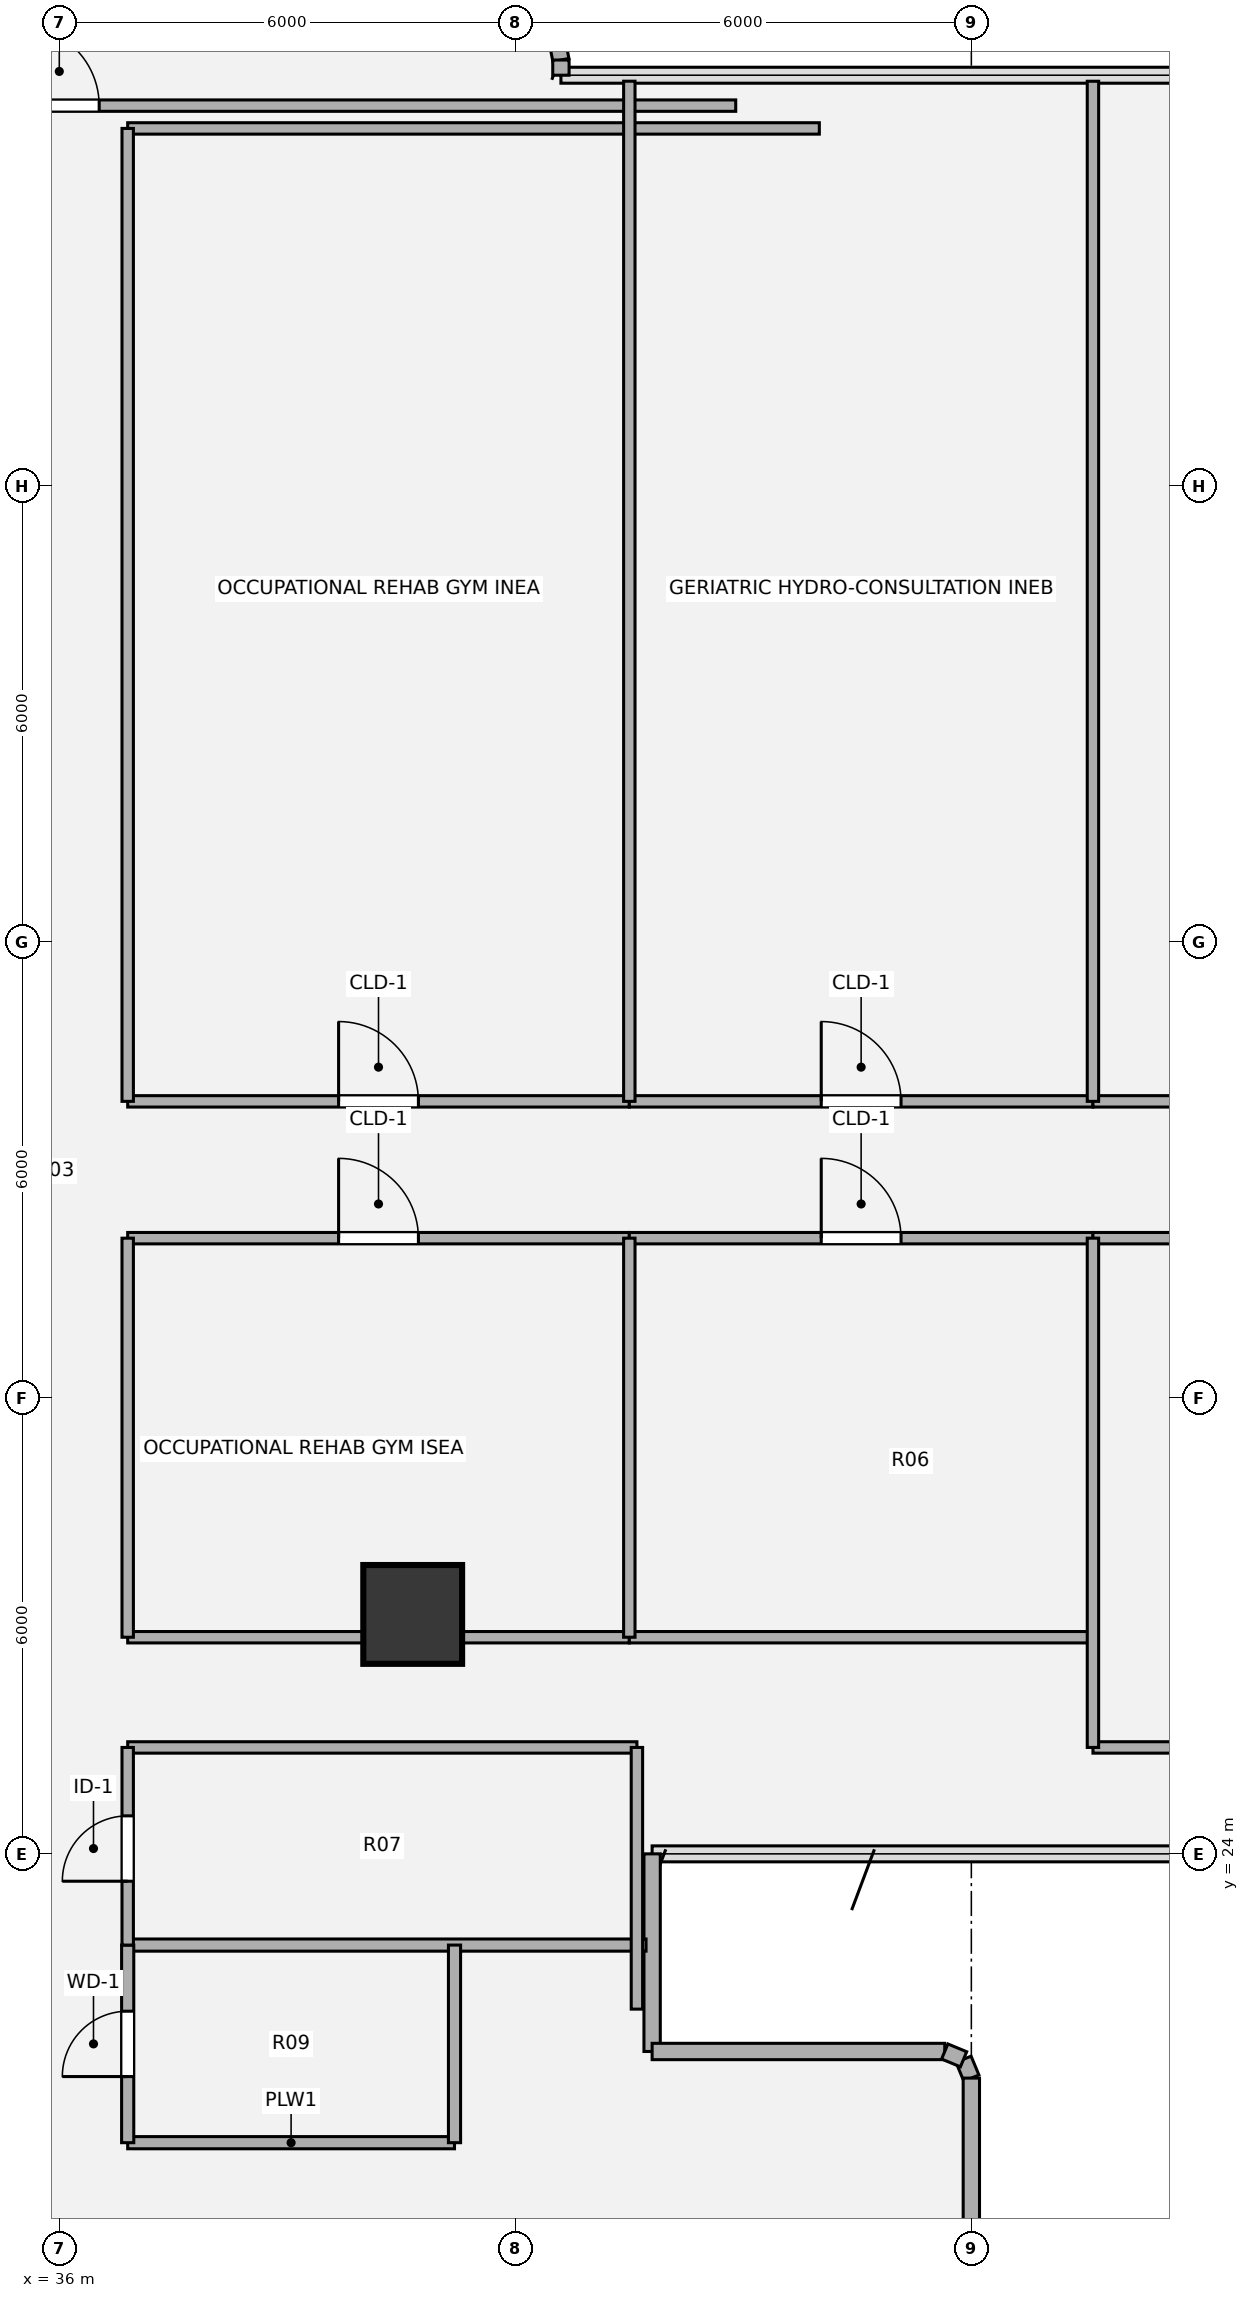
"""IFC4 building model, lengths in metres.
Left out: names, types, materials, properties, quantities, classifications, styles, units other than length and angle.
Written with IfcOpenShell. Run it as: python <this file> out.ifc"""

import sys

from ifc_helpers import new_model, si_unit, direction, frame, frame_2d, origin, origin_2d, place, context, subcontext, project, spatial, rectangle, hollow_circle, extrude, source, transform, mapped, element, fill, save


model = new_model("IFC4")
c1 = context("Model", 3, precision=1e-05, world=origin(), true_north=direction((0.0, 1.0)))
c2 = subcontext(c1, "Body", "Model", "MODEL_VIEW")
j1 = project(units=[si_unit("LENGTHUNIT", "METRE"), si_unit("PLANEANGLEUNIT", "RADIAN")], contexts=[c1])
p1 = place(None, origin())
s1 = spatial("IfcSite", under=j1, at=p1, CompositionType="ELEMENT")
p2 = place(p1, origin())
s2 = spatial("IfcBuilding", under=s1, at=p2, CompositionType="ELEMENT")
p3 = place(p2, frame((0.0, 0.0, 108.72)))
s3 = spatial("IfcBuildingStorey", under=s2, at=p3, CompositionType="ELEMENT", Elevation=108.72)
m1 = source(origin(), c2, "Body", "SweptSolid", [
    extrude(hollow_circle(Radius=0.65, WallThickness=0.045, at=origin_2d()), origin(), (0.0, 0.0, 1.0), 3.78),
])
p4 = place(p3, frame((40.65, 27.15, 0.0), z_axis=(0.0, 0.0, 1.0), x_axis=(1.0, 0.0, 0.0)))
e1 = element("IfcColumn", 1, at=p4, inside=s3, PredefinedType="COLUMN", context=c2, shape_type="MappedRepresentation", body=[
    mapped(m1, transform((0.0, 0.0, 0.0), x_axis=(1.0, 0.0, 0.0), y_axis=(0.0, 1.0, 0.0), z_axis=(0.0, 0.0, 1.0), scale=1.0)),
])
p5 = place(p3, frame((47.897, 21.298, 0.0), z_axis=(0.0, 0.0, 1.0), x_axis=(0.382673670509, -0.923883575944, 0.0)))
e2 = element("IfcWall", 2, at=p5, inside=s3, PredefinedType="SOLIDWALL", context=c2, shape_type="SweptSolid", body=[
    extrude(rectangle(XDim=0.268, YDim=0.215, at=frame_2d((0.134, 0.0))), origin(), (0.0, 0.0, 1.0), 3.53),
])
p6 = place(p3, frame((48.0, 21.05, 0.0), z_axis=(0.0, 0.0, 1.0), x_axis=(0.0, -1.0, 0.0)))
e3 = element("IfcWall", 3, at=p6, inside=s3, PredefinedType="SOLIDWALL", context=c2, shape_type="SweptSolid", body=[
    extrude(rectangle(XDim=2.62, YDim=0.215, at=frame_2d((1.31, 0.0))), origin(), (0.0, 0.0, 1.0), 3.53),
])
p7 = place(p3, frame((42.387, 48.671, 0.0), z_axis=(0.0, 0.0, 1.0), x_axis=(0.195127417394, -0.980777900945, 0.0)))
e4 = element("IfcWall", 4, at=p7, inside=s3, PredefinedType="SOLIDWALL", context=c2, shape_type="SweptSolid", body=[
    extrude(rectangle(XDim=1.092, YDim=0.215, at=frame_2d((0.546, 0.0))), origin(), (0.0, 0.0, 1.0), 3.53),
])
p8 = place(p3, frame((42.6, 47.6, 0.0), z_axis=(0.0, 0.0, 1.0), x_axis=(0.0, -1.0, 0.0)))
e5 = element("IfcWall", 5, at=p8, inside=s3, PredefinedType="SOLIDWALL", context=c2, shape_type="SweptSolid", body=[
    extrude(rectangle(XDim=0.2, YDim=0.215, at=frame_2d((0.1, 0.0))), origin(), (0.0, 0.0, 1.0), 3.53),
])
p9 = place(p3, frame((43.8, 24.0, 0.0), z_axis=(0.0, 0.0, 1.0), x_axis=(0.0, -1.0, 0.0)))
e6 = element("IfcWall", 6, at=p9, inside=s3, PredefinedType="SOLIDWALL", context=c2, shape_type="SweptSolid", body=[
    extrude(rectangle(XDim=2.6, YDim=0.215, at=frame_2d((1.3, 0.0))), origin(), (0.0, 0.0, 1.0), 3.53),
])
p10 = place(p3, frame((43.8, 21.4, 0.0), z_axis=(0.0, 0.0, 1.0), x_axis=(1.0, 0.0, 0.0)))
e7 = element("IfcWall", 7, at=p10, inside=s3, PredefinedType="SOLIDWALL", context=c2, shape_type="SweptSolid", body=[
    extrude(rectangle(XDim=3.85, YDim=0.215, at=frame_2d((1.925, 0.0))), origin(), (0.0, 0.0, 1.0), 3.53),
])
p11 = place(p3, frame((47.65, 21.4, 0.0), z_axis=(0.0, 0.0, 1.0), x_axis=(0.924205486139, -0.381895560841, 0.0)))
e8 = element("IfcWall", 8, at=p11, inside=s3, PredefinedType="SOLIDWALL", context=c2, shape_type="SweptSolid", body=[
    extrude(rectangle(XDim=0.268, YDim=0.215, at=frame_2d((0.134, 0.0))), origin(), (0.0, 0.0, 1.0), 3.53),
])
p12 = place(p3, frame((36.9, 20.2, 0.0), z_axis=(0.0, 0.0, 1.0), x_axis=(1.0, 0.0, 0.0)))
e9 = element("IfcWall", 9, at=p12, inside=s3, PredefinedType="PLUMBINGWALL", context=c2, shape_type="SweptSolid", body=[
    extrude(rectangle(XDim=4.3, YDim=0.16, at=frame_2d((2.15, 0.0))), origin(), (0.0, 0.0, 1.0), 3.5),
])
p13 = place(p3, frame((36.9, 22.8, 0.0), z_axis=(0.0, 0.0, 1.0), x_axis=(1.0, 0.0, 0.0)))
e10 = element("IfcWall", 10, at=p13, inside=s3, PredefinedType="PLUMBINGWALL", context=c2, shape_type="SweptSolid", body=[
    extrude(rectangle(XDim=6.82, YDim=0.16, at=frame_2d((3.41, 0.0))), origin(), (0.0, 0.0, 1.0), 3.5),
])
p14 = place(p3, frame((36.9, 25.4, 0.0), z_axis=(0.0, 0.0, 1.0), x_axis=(1.0, 0.0, 0.0)))
e11 = element("IfcWall", 11, at=p14, inside=s3, PredefinedType="PARTITIONING", context=c2, shape_type="SweptSolid", body=[
    extrude(rectangle(XDim=6.7, YDim=0.15, at=frame_2d((3.35, 0.0))), origin(), (0.0, 0.0, 1.0), 3.5),
])
p15 = place(p3, frame((49.6, 25.4, 0.0), z_axis=(0.0, 0.0, 1.0), x_axis=(1.0, 0.0, 0.0)))
e12 = element("IfcWall", 12, at=p15, inside=s3, PredefinedType="PARTITIONING", context=c2, shape_type="SweptSolid", body=[
    extrude(rectangle(XDim=7.776, YDim=0.15, at=frame_2d((3.888, 0.0))), origin(), (0.0, 0.0, 1.0), 3.5),
])
p16 = place(p3, frame((36.9, 26.85, 0.0), z_axis=(0.0, 0.0, 1.0), x_axis=(1.0, 0.0, 0.0)))
e13 = element("IfcWall", 13, at=p16, inside=s3, PredefinedType="PARTITIONING", context=c2, shape_type="SweptSolid", body=[
    extrude(rectangle(XDim=6.6, YDim=0.15, at=frame_2d((3.3, 0.0))), origin(), (0.0, 0.0, 1.0), 2.903),
])
p17 = place(p3, frame((43.5, 26.85, 0.0), z_axis=(0.0, 0.0, 1.0), x_axis=(1.0, 0.0, 0.0)))
e14 = element("IfcWall", 14, at=p17, inside=s3, PredefinedType="PARTITIONING", context=c2, shape_type="SweptSolid", body=[
    extrude(rectangle(XDim=6.1, YDim=0.15, at=frame_2d((3.05, 0.0))), origin(), (0.0, 0.0, 1.0), 3.055),
])
p18 = place(p3, frame((36.9, 32.1, 0.0), z_axis=(0.0, 0.0, 1.0), x_axis=(1.0, 0.0, 0.0)))
e15 = element("IfcWall", 15, at=p18, inside=s3, PredefinedType="PARTITIONING", context=c2, shape_type="SweptSolid", body=[
    extrude(rectangle(XDim=6.6, YDim=0.15, at=frame_2d((3.3, 0.0))), origin(), (0.0, 0.0, 1.0), 2.982),
])
p19 = place(p18, frame((2.775, 0.0, 0.0)))
e16 = element("IfcOpeningElement", 16, at=p19, cuts=e15, PredefinedType="OPENING", context=c2, shape_type="SweptSolid", body=[
    extrude(rectangle(XDim=1.05, YDim=2.1, at=origin_2d()), frame((0.525, 0.085, 1.05), z_axis=(0.0, -1.0, 0.0), x_axis=(1.0, 0.0, 0.0)), (0.0, 0.0, 1.0), 0.17),
])
p20 = place(p3, frame((43.5, 32.1, 0.0), z_axis=(0.0, 0.0, 1.0), x_axis=(1.0, 0.0, 0.0)))
e17 = element("IfcWall", 17, at=p20, inside=s3, PredefinedType="PARTITIONING", context=c2, shape_type="SweptSolid", body=[
    extrude(rectangle(XDim=6.1, YDim=0.15, at=frame_2d((3.05, 0.0))), origin(), (0.0, 0.0, 1.0), 2.982),
])
p21 = place(p20, frame((2.525, 0.0, 0.0)))
e18 = element("IfcOpeningElement", 18, at=p21, cuts=e17, PredefinedType="OPENING", context=c2, shape_type="SweptSolid", body=[
    extrude(rectangle(XDim=1.05, YDim=2.1, at=origin_2d()), frame((0.525, 0.085, 1.05), z_axis=(0.0, -1.0, 0.0), x_axis=(1.0, 0.0, 0.0)), (0.0, 0.0, 1.0), 0.17),
])
p22 = place(p3, frame((49.6, 32.1, 0.0), z_axis=(0.0, 0.0, 1.0), x_axis=(1.0, 0.0, 0.0)))
e19 = element("IfcWall", 19, at=p22, inside=s3, PredefinedType="PARTITIONING", context=c2, shape_type="SweptSolid", body=[
    extrude(rectangle(XDim=8.42, YDim=0.15, at=frame_2d((4.21, 0.0))), origin(), (0.0, 0.0, 1.0), 2.982),
])
p23 = place(p22, frame((1.375, 0.0, 0.0)))
e20 = element("IfcOpeningElement", 20, at=p23, cuts=e19, PredefinedType="OPENING", context=c2, shape_type="SweptSolid", body=[
    extrude(rectangle(XDim=1.05, YDim=2.1, at=origin_2d()), frame((0.525, 0.085, 1.05), z_axis=(0.0, -1.0, 0.0), x_axis=(1.0, 0.0, 0.0)), (0.0, 0.0, 1.0), 0.17),
])
p24 = place(p3, frame((36.9, 33.9, 0.0), z_axis=(0.0, 0.0, 1.0), x_axis=(1.0, 0.0, 0.0)))
e21 = element("IfcWall", 21, at=p24, inside=s3, PredefinedType="PARTITIONING", context=c2, shape_type="SweptSolid", body=[
    extrude(rectangle(XDim=6.6, YDim=0.15, at=frame_2d((3.3, 0.0))), origin(), (0.0, 0.0, 1.0), 2.982),
])
p25 = place(p24, frame((2.775, 0.0, 0.0)))
e22 = element("IfcOpeningElement", 22, at=p25, cuts=e21, PredefinedType="OPENING", context=c2, shape_type="SweptSolid", body=[
    extrude(rectangle(XDim=1.05, YDim=2.1, at=origin_2d()), frame((0.525, 0.085, 1.05), z_axis=(0.0, -1.0, 0.0), x_axis=(1.0, 0.0, 0.0)), (0.0, 0.0, 1.0), 0.17),
])
p26 = place(p3, frame((43.5, 33.9, 0.0), z_axis=(0.0, 0.0, 1.0), x_axis=(1.0, 0.0, 0.0)))
e23 = element("IfcWall", 23, at=p26, inside=s3, PredefinedType="PARTITIONING", context=c2, shape_type="SweptSolid", body=[
    extrude(rectangle(XDim=6.1, YDim=0.15, at=frame_2d((3.05, 0.0))), origin(), (0.0, 0.0, 1.0), 2.982),
])
p27 = place(p26, frame((2.525, 0.0, 0.0)))
e24 = element("IfcOpeningElement", 24, at=p27, cuts=e23, PredefinedType="OPENING", context=c2, shape_type="SweptSolid", body=[
    extrude(rectangle(XDim=1.05, YDim=2.1, at=origin_2d()), frame((0.525, 0.085, 1.05), z_axis=(0.0, -1.0, 0.0), x_axis=(1.0, 0.0, 0.0)), (0.0, 0.0, 1.0), 0.17),
])
p28 = place(p3, frame((49.6, 33.9, 0.0), z_axis=(0.0, 0.0, 1.0), x_axis=(1.0, 0.0, 0.0)))
e25 = element("IfcWall", 25, at=p28, inside=s3, PredefinedType="PARTITIONING", context=c2, shape_type="SweptSolid", body=[
    extrude(rectangle(XDim=8.42, YDim=0.15, at=frame_2d((4.21, 0.0))), origin(), (0.0, 0.0, 1.0), 2.982),
])
p29 = place(p28, frame((1.375, 0.0, 0.0)))
e26 = element("IfcOpeningElement", 26, at=p29, cuts=e25, PredefinedType="OPENING", context=c2, shape_type="SweptSolid", body=[
    extrude(rectangle(XDim=1.05, YDim=2.1, at=origin_2d()), frame((0.525, 0.085, 1.05), z_axis=(0.0, -1.0, 0.0), x_axis=(1.0, 0.0, 0.0)), (0.0, 0.0, 1.0), 0.17),
])
p30 = place(p3, frame((36.9, 46.7, 0.0), z_axis=(0.0, 0.0, 1.0), x_axis=(1.0, 0.0, 0.0)))
e27 = element("IfcWall", 27, at=p30, inside=s3, PredefinedType="PARTITIONING", context=c2, shape_type="SweptSolid", body=[
    extrude(rectangle(XDim=9.1, YDim=0.15, at=frame_2d((4.55, 0.0))), origin(), (0.0, 0.0, 1.0), 3.308),
])
p31 = place(p3, frame((27.1, 47.0, 0.0), z_axis=(0.0, 0.0, 1.0), x_axis=(1.0, 0.0, 0.0)))
e28 = element("IfcWall", 28, at=p31, inside=s3, PredefinedType="PARTITIONING", context=c2, shape_type="SweptSolid", body=[
    extrude(rectangle(XDim=17.8, YDim=0.15, at=frame_2d((8.9, 0.0))), origin(), (0.0, 0.0, 1.0), 3.308),
])
p32 = place(p31, frame((8.375, 0.0, 0.0)))
e29 = element("IfcOpeningElement", 29, at=p32, cuts=e28, PredefinedType="OPENING", context=c2, shape_type="SweptSolid", body=[
    extrude(rectangle(XDim=1.05, YDim=2.1, at=origin_2d()), frame((0.525, 0.085, 1.05), z_axis=(0.0, -1.0, 0.0), x_axis=(1.0, 0.0, 0.0)), (0.0, 0.0, 1.0), 0.17),
])
p33 = place(p3, frame((36.9, 20.2, 0.0), z_axis=(0.0, 0.0, 1.0), x_axis=(0.0, 1.0, 0.0)))
e30 = element("IfcWall", 30, at=p33, inside=s3, PredefinedType="PLUMBINGWALL", context=c2, shape_type="SweptSolid", body=[
    extrude(rectangle(XDim=2.6, YDim=0.16, at=frame_2d((1.3, 0.0))), origin(), (0.0, 0.0, 1.0), 3.5),
])
p34 = place(p33, frame((0.87, 0.0, 0.0)))
e31 = element("IfcOpeningElement", 31, at=p34, cuts=e30, PredefinedType="OPENING", context=c2, shape_type="SweptSolid", body=[
    extrude(rectangle(XDim=0.86, YDim=2.1, at=origin_2d()), frame((0.43, 0.09, 1.05), z_axis=(0.0, -1.0, 0.0), x_axis=(1.0, 0.0, 0.0)), (0.0, 0.0, 1.0), 0.18),
])
p35 = place(p3, frame((36.9, 22.8, 0.0), z_axis=(0.0, 0.0, 1.0), x_axis=(0.0, 1.0, 0.0)))
e32 = element("IfcWall", 32, at=p35, inside=s3, PredefinedType="PARTITIONING", context=c2, shape_type="SweptSolid", body=[
    extrude(rectangle(XDim=2.6, YDim=0.15, at=frame_2d((1.3, 0.0))), origin(), (0.0, 0.0, 1.0), 3.5),
])
p36 = place(p35, frame((0.84, 0.0, 0.0)))
e33 = element("IfcOpeningElement", 33, at=p36, cuts=e32, PredefinedType="OPENING", context=c2, shape_type="SweptSolid", body=[
    extrude(rectangle(XDim=0.86, YDim=2.1, at=origin_2d()), frame((0.43, 0.085, 1.05), z_axis=(0.0, -1.0, 0.0), x_axis=(1.0, 0.0, 0.0)), (0.0, 0.0, 1.0), 0.17),
])
p37 = place(p3, frame((36.9, 26.85, 0.0), z_axis=(0.0, 0.0, 1.0), x_axis=(0.0, 1.0, 0.0)))
e34 = element("IfcWall", 34, at=p37, inside=s3, PredefinedType="PARTITIONING", context=c2, shape_type="SweptSolid", body=[
    extrude(rectangle(XDim=5.25, YDim=0.15, at=frame_2d((2.625, 0.0))), origin(), (0.0, 0.0, 1.0), 3.5),
])
p38 = place(p3, frame((36.9, 33.9, 0.0), z_axis=(0.0, 0.0, 1.0), x_axis=(0.0, 1.0, 0.0)))
e35 = element("IfcWall", 35, at=p38, inside=s3, PredefinedType="PARTITIONING", context=c2, shape_type="SweptSolid", body=[
    extrude(rectangle(XDim=12.8, YDim=0.15, at=frame_2d((6.4, 0.0))), origin(), (0.0, 0.0, 1.0), 3.5),
])
p39 = place(p3, frame((41.2, 20.2, 0.0), z_axis=(0.0, 0.0, 1.0), x_axis=(0.0, 1.0, 0.0)))
e36 = element("IfcWall", 36, at=p39, inside=s3, PredefinedType="PLUMBINGWALL", context=c2, shape_type="SweptSolid", body=[
    extrude(rectangle(XDim=2.6, YDim=0.16, at=frame_2d((1.3, 0.0))), origin(), (0.0, 0.0, 1.0), 2.815),
])
p40 = place(p3, frame((43.5, 26.85, 0.0), z_axis=(0.0, 0.0, 1.0), x_axis=(0.0, 1.0, 0.0)))
e37 = element("IfcWall", 37, at=p40, inside=s3, PredefinedType="PARTITIONING", context=c2, shape_type="SweptSolid", body=[
    extrude(rectangle(XDim=5.25, YDim=0.15, at=frame_2d((2.625, 0.0))), origin(), (0.0, 0.0, 1.0), 3.5),
])
p41 = place(p3, frame((43.5, 33.9, 0.0), z_axis=(0.0, 0.0, 1.0), x_axis=(0.0, 1.0, 0.0)))
e38 = element("IfcWall", 38, at=p41, inside=s3, PredefinedType="PARTITIONING", context=c2, shape_type="SweptSolid", body=[
    extrude(rectangle(XDim=13.421, YDim=0.15, at=frame_2d((6.711, 0.0))), origin(), (0.0, 0.0, 1.0), 3.5),
])
p42 = place(p3, frame((43.6, 21.958, 0.0), z_axis=(0.0, 0.0, 1.0), x_axis=(0.0, 1.0, 0.0)))
e39 = element("IfcWall", 39, at=p42, inside=s3, PredefinedType="PARTITIONING", context=c2, shape_type="SweptSolid", body=[
    extrude(rectangle(XDim=3.442, YDim=0.15, at=frame_2d((1.721, 0.0))), origin(), (0.0, 0.0, 1.0), 3.5),
])
p43 = place(p3, frame((49.6, 25.4, 0.0), z_axis=(0.0, 0.0, 1.0), x_axis=(0.0, 1.0, 0.0)))
e40 = element("IfcWall", 40, at=p43, inside=s3, PredefinedType="PARTITIONING", context=c2, shape_type="SweptSolid", body=[
    extrude(rectangle(XDim=6.7, YDim=0.15, at=frame_2d((3.35, 0.0))), origin(), (0.0, 0.0, 1.0), 3.5),
])
p44 = place(p3, frame((49.6, 33.9, 0.0), z_axis=(0.0, 0.0, 1.0), x_axis=(0.0, 1.0, 0.0)))
e41 = element("IfcWall", 41, at=p44, inside=s3, PredefinedType="PARTITIONING", context=c2, shape_type="SweptSolid", body=[
    extrude(rectangle(XDim=13.421, YDim=0.15, at=frame_2d((6.71, 0.0))), origin(), (0.0, 0.0, 1.0), 3.5),
])
m2 = source(origin(), c2, "Body", "SweptSolid", [
    extrude(rectangle(XDim=1.05, YDim=2.1, at=origin_2d()), frame((0.525, 0.025, 1.05), z_axis=(0.0, -1.0, 0.0), x_axis=(1.0, 0.0, 0.0)), (0.0, 0.0, 1.0), 0.05),
])
p45 = place(p19, origin())
e42 = element("IfcDoor", 42, at=p45, inside=s3, OperationType="SINGLE_SWING_LEFT", PredefinedType="DOOR", context=c2, shape_type="MappedRepresentation", body=[
    mapped(m2, transform((0.0, 0.0, 0.0), x_axis=(1.0, 0.0, 0.0), y_axis=(0.0, 1.0, 0.0), z_axis=(0.0, 0.0, 1.0), scale=1.0)),
])
fill(e16, e42)
p46 = place(p21, origin())
e43 = element("IfcDoor", 43, at=p46, inside=s3, OperationType="SINGLE_SWING_LEFT", PredefinedType="DOOR", context=c2, shape_type="MappedRepresentation", body=[
    mapped(m2, transform((0.0, 0.0, 0.0), x_axis=(1.0, 0.0, 0.0), y_axis=(0.0, 1.0, 0.0), z_axis=(0.0, 0.0, 1.0), scale=1.0)),
])
fill(e18, e43)
p47 = place(p25, origin())
e44 = element("IfcDoor", 44, at=p47, inside=s3, OperationType="SINGLE_SWING_LEFT", PredefinedType="DOOR", context=c2, shape_type="MappedRepresentation", body=[
    mapped(m2, transform((0.0, 0.0, 0.0), x_axis=(1.0, 0.0, 0.0), y_axis=(0.0, 1.0, 0.0), z_axis=(0.0, 0.0, 1.0), scale=1.0)),
])
fill(e22, e44)
p48 = place(p27, origin())
e45 = element("IfcDoor", 45, at=p48, inside=s3, OperationType="SINGLE_SWING_LEFT", PredefinedType="DOOR", context=c2, shape_type="MappedRepresentation", body=[
    mapped(m2, transform((0.0, 0.0, 0.0), x_axis=(1.0, 0.0, 0.0), y_axis=(0.0, 1.0, 0.0), z_axis=(0.0, 0.0, 1.0), scale=1.0)),
])
fill(e24, e45)
p49 = place(p32, origin())
e46 = element("IfcDoor", 46, at=p49, inside=s3, OperationType="SINGLE_SWING_LEFT", PredefinedType="DOOR", context=c2, shape_type="MappedRepresentation", body=[
    mapped(m2, transform((0.0, 0.0, 0.0), x_axis=(1.0, 0.0, 0.0), y_axis=(0.0, 1.0, 0.0), z_axis=(0.0, 0.0, 1.0), scale=1.0)),
])
fill(e29, e46)
m3 = source(origin(), c2, "Body", "SweptSolid", [
    extrude(rectangle(XDim=0.86, YDim=2.1, at=origin_2d()), frame((0.43, 0.025, 1.05), z_axis=(0.0, -1.0, 0.0), x_axis=(1.0, 0.0, 0.0)), (0.0, 0.0, 1.0), 0.05),
])
p50 = place(p34, origin())
e47 = element("IfcDoor", 47, at=p50, inside=s3, OperationType="SINGLE_SWING_LEFT", PredefinedType="DOOR", context=c2, shape_type="MappedRepresentation", body=[
    mapped(m3, transform((0.0, 0.0, 0.0), x_axis=(1.0, 0.0, 0.0), y_axis=(0.0, 1.0, 0.0), z_axis=(0.0, 0.0, 1.0), scale=1.0)),
])
fill(e31, e47)
m4 = source(origin(), c2, "Body", "SweptSolid", [
    extrude(rectangle(XDim=0.86, YDim=2.1, at=origin_2d()), frame((0.43, 0.025, 1.05), z_axis=(0.0, -1.0, 0.0), x_axis=(1.0, 0.0, 0.0)), (0.0, 0.0, 1.0), 0.05),
])
p51 = place(p36, origin())
e48 = element("IfcDoor", 48, at=p51, inside=s3, OperationType="SINGLE_SWING_LEFT", PredefinedType="DOOR", context=c2, shape_type="MappedRepresentation", body=[
    mapped(m4, transform((0.0, 0.0, 0.0), x_axis=(1.0, 0.0, 0.0), y_axis=(0.0, 1.0, 0.0), z_axis=(0.0, 0.0, 1.0), scale=1.0)),
])
fill(e33, e48)
save(model, sys.argv[1])
